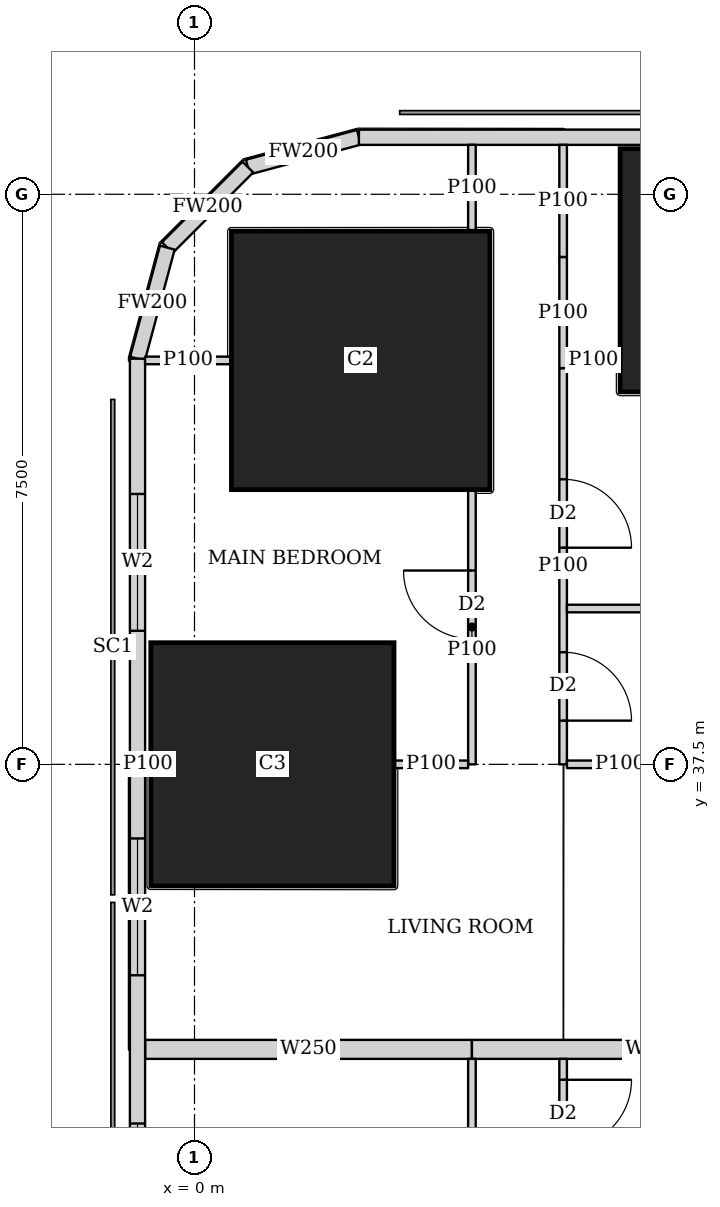
"""IFC4 building model, lengths in metres.
Left out: names, types, materials, properties, quantities, classifications, styles, units other than length and angle.
Written with IfcOpenShell. Run it as: python <this file> out.ifc"""

import sys

from ifc_helpers import new_model, si_unit, direction, frame, frame_2d, origin, origin_2d, place, context, subcontext, project, spatial, rectangle, extrude, element, fill, save


model = new_model("IFC4")
c1 = context("Model", 3, precision=1e-05, world=origin(), true_north=direction((0.0, 1.0)))
c2 = subcontext(c1, "Body", "Model", "MODEL_VIEW")
j1 = project(units=[si_unit("LENGTHUNIT", "METRE"), si_unit("PLANEANGLEUNIT", "RADIAN")], contexts=[c1])
p1 = place(None, origin())
s1 = spatial("IfcSite", under=j1, at=p1, CompositionType="ELEMENT")
p2 = place(p1, origin())
s2 = spatial("IfcBuilding", under=s1, at=p2, CompositionType="ELEMENT")
p3 = place(p2, frame((0.0, 0.0, 23.75)))
s3 = spatial("IfcBuildingStorey", under=s2, at=p3, CompositionType="ELEMENT", Elevation=23.75)
p4 = place(p3, frame((1.025, 37.5, 0.0), z_axis=(0.0, 0.0, 1.0), x_axis=(1.0, 0.0, 0.0)))
e1 = element("IfcColumn", 1, at=p4, inside=s3, PredefinedType="COLUMN", context=c2, shape_type="SweptSolid", body=[
    extrude(rectangle(XDim=3.2, YDim=3.2, at=origin_2d()), origin(), (0.0, 0.0, 1.0), 3.75),
])
p5 = place(p3, frame((2.186, 42.814, 0.0), z_axis=(0.0, 0.0, 1.0), x_axis=(1.0, 0.0, 0.0)))
e2 = element("IfcColumn", 2, at=p5, inside=s3, PredefinedType="COLUMN", context=c2, shape_type="SweptSolid", body=[
    extrude(rectangle(XDim=3.4, YDim=3.4, at=origin_2d()), origin(), (0.0, 0.0, 1.0), 3.75),
])
p6 = place(p3, frame((7.2, 44.0, 0.0), z_axis=(0.0, 0.0, 1.0), x_axis=(1.0, 0.0, 0.0)))
e3 = element("IfcColumn", 3, at=p6, inside=s3, PredefinedType="COLUMN", context=c2, shape_type="SweptSolid", body=[
    extrude(rectangle(XDim=3.2, YDim=3.2, at=origin_2d()), origin(), (0.0, 0.0, 1.0), 3.75),
])
p7 = place(p3, frame((40.106, 45.75, 0.0), z_axis=(0.0, 0.0, 1.0), x_axis=(-1.0, 0.0, 0.0)))
e4 = element("IfcWall", 4, at=p7, inside=s3, PredefinedType="SOLIDWALL", context=c2, shape_type="SweptSolid", body=[
    extrude(rectangle(XDim=37.943, YDim=0.2, at=frame_2d((18.971, 0.0))), origin(), (0.0, 0.0, 1.0), 3.5),
])
p8 = place(p7, frame((8.606, 0.0, 0.9)))
e5 = element("IfcOpeningElement", 5, at=p8, cuts=e4, PredefinedType="OPENING", context=c2, shape_type="SweptSolid", body=[
    extrude(rectangle(XDim=1.8, YDim=1.5, at=frame_2d((0.9, 0.75))), frame((0.0, 0.11, 0.0), z_axis=(0.0, -1.0, 0.0), x_axis=(1.0, 0.0, 0.0)), (0.0, 0.0, 1.0), 0.22),
])
p9 = place(p7, frame((12.206, 0.0, 0.9)))
e6 = element("IfcOpeningElement", 6, at=p9, cuts=e4, PredefinedType="OPENING", context=c2, shape_type="SweptSolid", body=[
    extrude(rectangle(XDim=1.8, YDim=1.5, at=frame_2d((0.9, 0.75))), frame((0.0, 0.11, 0.0), z_axis=(0.0, -1.0, 0.0), x_axis=(1.0, 0.0, 0.0)), (0.0, 0.0, 1.0), 0.22),
])
p10 = place(p7, frame((15.806, 0.0, 0.9)))
e7 = element("IfcOpeningElement", 7, at=p10, cuts=e4, PredefinedType="OPENING", context=c2, shape_type="SweptSolid", body=[
    extrude(rectangle(XDim=1.8, YDim=1.5, at=frame_2d((0.9, 0.75))), frame((0.0, 0.11, 0.0), z_axis=(0.0, -1.0, 0.0), x_axis=(1.0, 0.0, 0.0)), (0.0, 0.0, 1.0), 0.22),
])
p11 = place(p7, frame((19.406, 0.0, 0.9)))
e8 = element("IfcOpeningElement", 8, at=p11, cuts=e4, PredefinedType="OPENING", context=c2, shape_type="SweptSolid", body=[
    extrude(rectangle(XDim=1.8, YDim=1.5, at=frame_2d((0.9, 0.75))), frame((0.0, 0.11, 0.0), z_axis=(0.0, -1.0, 0.0), x_axis=(1.0, 0.0, 0.0)), (0.0, 0.0, 1.0), 0.22),
])
p12 = place(p7, frame((23.006, 0.0, 0.9)))
e9 = element("IfcOpeningElement", 9, at=p12, cuts=e4, PredefinedType="OPENING", context=c2, shape_type="SweptSolid", body=[
    extrude(rectangle(XDim=1.8, YDim=1.5, at=frame_2d((0.9, 0.75))), frame((0.0, 0.11, 0.0), z_axis=(0.0, -1.0, 0.0), x_axis=(1.0, 0.0, 0.0)), (0.0, 0.0, 1.0), 0.22),
])
p13 = place(p7, frame((26.606, 0.0, 0.9)))
e10 = element("IfcOpeningElement", 10, at=p13, cuts=e4, PredefinedType="OPENING", context=c2, shape_type="SweptSolid", body=[
    extrude(rectangle(XDim=1.8, YDim=1.5, at=frame_2d((0.9, 0.75))), frame((0.0, 0.11, 0.0), z_axis=(0.0, -1.0, 0.0), x_axis=(1.0, 0.0, 0.0)), (0.0, 0.0, 1.0), 0.22),
])
p14 = place(p3, frame((2.163, 45.75, 0.0), z_axis=(0.0, 0.0, 1.0), x_axis=(-0.965832000415, -0.259168954497, 0.0)))
e11 = element("IfcWall", 11, at=p14, inside=s3, PredefinedType="SOLIDWALL", context=c2, shape_type="SweptSolid", body=[
    extrude(rectangle(XDim=1.513, YDim=0.2, at=frame_2d((0.756, 0.0))), origin(), (0.0, 0.0, 1.0), 3.5),
])
p15 = place(p3, frame((0.702, 45.358, 0.0), z_axis=(0.0, 0.0, 1.0), x_axis=(-0.707106781187, -0.707106781187, 0.0)))
e12 = element("IfcWall", 12, at=p15, inside=s3, PredefinedType="SOLIDWALL", context=c2, shape_type="SweptSolid", body=[
    extrude(rectangle(XDim=1.499, YDim=0.2, at=frame_2d((0.75, 0.0))), origin(), (0.0, 0.0, 1.0), 3.5),
])
p16 = place(p3, frame((-0.358, 44.298, 0.0), z_axis=(0.0, 0.0, 1.0), x_axis=(-0.259168954497, -0.965832000415, 0.0)))
e13 = element("IfcWall", 13, at=p16, inside=s3, PredefinedType="SOLIDWALL", context=c2, shape_type="SweptSolid", body=[
    extrude(rectangle(XDim=1.513, YDim=0.2, at=frame_2d((0.756, 0.0))), origin(), (0.0, 0.0, 1.0), 3.5),
])
p17 = place(p3, frame((-0.75, 42.837, 0.0), z_axis=(0.0, 0.0, 1.0), x_axis=(0.0, -1.0, 0.0)))
e14 = element("IfcWall", 14, at=p17, inside=s3, PredefinedType="SOLIDWALL", context=c2, shape_type="SweptSolid", body=[
    extrude(rectangle(XDim=40.674, YDim=0.2, at=frame_2d((20.337, 0.0))), origin(), (0.0, 0.0, 1.0), 3.5),
])
p18 = place(p17, frame((1.78, 0.0, 0.9)))
e15 = element("IfcOpeningElement", 15, at=p18, cuts=e14, PredefinedType="OPENING", context=c2, shape_type="SweptSolid", body=[
    extrude(rectangle(XDim=1.8, YDim=1.5, at=frame_2d((0.9, 0.75))), frame((0.0, 0.11, 0.0), z_axis=(0.0, -1.0, 0.0), x_axis=(1.0, 0.0, 0.0)), (0.0, 0.0, 1.0), 0.22),
])
p19 = place(p17, frame((6.312, 0.0, 0.9)))
e16 = element("IfcOpeningElement", 16, at=p19, cuts=e14, PredefinedType="OPENING", context=c2, shape_type="SweptSolid", body=[
    extrude(rectangle(XDim=1.8, YDim=1.5, at=frame_2d((0.9, 0.75))), frame((0.0, 0.11, 0.0), z_axis=(0.0, -1.0, 0.0), x_axis=(1.0, 0.0, 0.0)), (0.0, 0.0, 1.0), 0.22),
])
p20 = place(p17, frame((10.062, 0.0, 0.9)))
e17 = element("IfcOpeningElement", 17, at=p20, cuts=e14, PredefinedType="OPENING", context=c2, shape_type="SweptSolid", body=[
    extrude(rectangle(XDim=1.8, YDim=1.5, at=frame_2d((0.9, 0.75))), frame((0.0, 0.11, 0.0), z_axis=(0.0, -1.0, 0.0), x_axis=(1.0, 0.0, 0.0)), (0.0, 0.0, 1.0), 0.22),
])
p21 = place(p17, frame((13.812, 0.0, 0.9)))
e18 = element("IfcOpeningElement", 18, at=p21, cuts=e14, PredefinedType="OPENING", context=c2, shape_type="SweptSolid", body=[
    extrude(rectangle(XDim=1.8, YDim=1.5, at=frame_2d((0.9, 0.75))), frame((0.0, 0.11, 0.0), z_axis=(0.0, -1.0, 0.0), x_axis=(1.0, 0.0, 0.0)), (0.0, 0.0, 1.0), 0.22),
])
p22 = place(p17, frame((17.562, 0.0, 0.9)))
e19 = element("IfcOpeningElement", 19, at=p22, cuts=e14, PredefinedType="OPENING", context=c2, shape_type="SweptSolid", body=[
    extrude(rectangle(XDim=1.8, YDim=1.5, at=frame_2d((0.9, 0.75))), frame((0.0, 0.11, 0.0), z_axis=(0.0, -1.0, 0.0), x_axis=(1.0, 0.0, 0.0)), (0.0, 0.0, 1.0), 0.22),
])
p23 = place(p17, frame((21.312, 0.0, 0.9)))
e20 = element("IfcOpeningElement", 20, at=p23, cuts=e14, PredefinedType="OPENING", context=c2, shape_type="SweptSolid", body=[
    extrude(rectangle(XDim=1.8, YDim=1.5, at=frame_2d((0.9, 0.75))), frame((0.0, 0.11, 0.0), z_axis=(0.0, -1.0, 0.0), x_axis=(1.0, 0.0, 0.0)), (0.0, 0.0, 1.0), 0.22),
])
p24 = place(p17, frame((25.062, 0.0, 0.9)))
e21 = element("IfcOpeningElement", 21, at=p24, cuts=e14, PredefinedType="OPENING", context=c2, shape_type="SweptSolid", body=[
    extrude(rectangle(XDim=1.8, YDim=1.5, at=frame_2d((0.9, 0.75))), frame((0.0, 0.11, 0.0), z_axis=(0.0, -1.0, 0.0), x_axis=(1.0, 0.0, 0.0)), (0.0, 0.0, 1.0), 0.22),
])
p25 = place(p17, frame((28.812, 0.0, 0.9)))
e22 = element("IfcOpeningElement", 22, at=p25, cuts=e14, PredefinedType="OPENING", context=c2, shape_type="SweptSolid", body=[
    extrude(rectangle(XDim=1.8, YDim=1.5, at=frame_2d((0.9, 0.75))), frame((0.0, 0.11, 0.0), z_axis=(0.0, -1.0, 0.0), x_axis=(1.0, 0.0, 0.0)), (0.0, 0.0, 1.0), 0.22),
])
p26 = place(p17, frame((32.562, 0.0, 0.9)))
e23 = element("IfcOpeningElement", 23, at=p26, cuts=e14, PredefinedType="OPENING", context=c2, shape_type="SweptSolid", body=[
    extrude(rectangle(XDim=1.8, YDim=1.5, at=frame_2d((0.9, 0.75))), frame((0.0, 0.11, 0.0), z_axis=(0.0, -1.0, 0.0), x_axis=(1.0, 0.0, 0.0)), (0.0, 0.0, 1.0), 0.22),
])
p27 = place(p17, frame((37.094, 0.0, 0.9)))
e24 = element("IfcOpeningElement", 24, at=p27, cuts=e14, PredefinedType="OPENING", context=c2, shape_type="SweptSolid", body=[
    extrude(rectangle(XDim=1.8, YDim=1.5, at=frame_2d((0.9, 0.75))), frame((0.0, 0.11, 0.0), z_axis=(0.0, -1.0, 0.0), x_axis=(1.0, 0.0, 0.0)), (0.0, 0.0, 1.0), 0.22),
])
p28 = place(p3, frame((3.65, 30.0, 0.0), z_axis=(0.0, 0.0, 1.0), x_axis=(0.0, 1.0, 0.0)))
e25 = element("IfcWall", 25, at=p28, inside=s3, PredefinedType="PARTITIONING", context=c2, shape_type="SweptSolid", body=[
    extrude(rectangle(XDim=3.625, YDim=0.1, at=frame_2d((1.812, 0.0))), origin(), (0.0, 0.0, 1.0), 3.5),
])
p29 = place(p28, frame((1.65, 0.0, 0.0)))
e26 = element("IfcOpeningElement", 26, at=p29, cuts=e25, PredefinedType="OPENING", context=c2, shape_type="SweptSolid", body=[
    extrude(rectangle(XDim=0.9, YDim=2.1, at=frame_2d((0.45, 1.05))), frame((0.0, 0.06, 0.0), z_axis=(0.0, -1.0, 0.0), x_axis=(1.0, 0.0, 0.0)), (0.0, 0.0, 1.0), 0.12),
])
p30 = place(p3, frame((4.85, 30.0, 0.0), z_axis=(0.0, 0.0, 1.0), x_axis=(0.0, 1.0, 0.0)))
e27 = element("IfcWall", 27, at=p30, inside=s3, PredefinedType="PARTITIONING", context=c2, shape_type="SweptSolid", body=[
    extrude(rectangle(XDim=3.625, YDim=0.1, at=frame_2d((1.812, 0.0))), origin(), (0.0, 0.0, 1.0), 3.5),
])
p31 = place(p30, frame((0.575, 0.0, 0.0)))
e28 = element("IfcOpeningElement", 28, at=p31, cuts=e27, PredefinedType="OPENING", context=c2, shape_type="SweptSolid", body=[
    extrude(rectangle(XDim=0.9, YDim=2.1, at=frame_2d((0.45, 1.05))), frame((0.0, 0.06, 0.0), z_axis=(0.0, -1.0, 0.0), x_axis=(1.0, 0.0, 0.0)), (0.0, 0.0, 1.0), 0.12),
])
p32 = place(p30, frame((2.45, 0.0, 0.0)))
e29 = element("IfcOpeningElement", 29, at=p32, cuts=e27, PredefinedType="OPENING", context=c2, shape_type="SweptSolid", body=[
    extrude(rectangle(XDim=0.9, YDim=2.1, at=frame_2d((0.45, 1.05))), frame((0.0, 0.06, 0.0), z_axis=(0.0, -1.0, 0.0), x_axis=(1.0, 0.0, 0.0)), (0.0, 0.0, 1.0), 0.12),
])
p33 = place(p3, frame((3.65, 37.5, 0.0), z_axis=(0.0, 0.0, 1.0), x_axis=(0.0, 1.0, 0.0)))
e30 = element("IfcWall", 30, at=p33, inside=s3, PredefinedType="PARTITIONING", context=c2, shape_type="SweptSolid", body=[
    extrude(rectangle(XDim=3.613, YDim=0.1, at=frame_2d((1.807, 0.0))), origin(), (0.0, 0.0, 1.0), 3.5),
])
p34 = place(p33, frame((1.65, 0.0, 0.0)))
e31 = element("IfcOpeningElement", 31, at=p34, cuts=e30, PredefinedType="OPENING", context=c2, shape_type="SweptSolid", body=[
    extrude(rectangle(XDim=0.9, YDim=2.1, at=frame_2d((0.45, 1.05))), frame((0.0, 0.06, 0.0), z_axis=(0.0, -1.0, 0.0), x_axis=(1.0, 0.0, 0.0)), (0.0, 0.0, 1.0), 0.12),
])
p35 = place(p3, frame((3.65, 44.515, 0.0), z_axis=(0.0, 0.0, 1.0), x_axis=(0.0, 1.0, 0.0)))
e32 = element("IfcWall", 32, at=p35, inside=s3, PredefinedType="PARTITIONING", context=c2, shape_type="SweptSolid", body=[
    extrude(rectangle(XDim=1.135, YDim=0.1, at=frame_2d((0.567, 0.0))), origin(), (0.0, 0.0, 1.0), 3.5),
])
p36 = place(p3, frame((4.85, 37.5, 0.0), z_axis=(0.0, 0.0, 1.0), x_axis=(0.0, 1.0, 0.0)))
e33 = element("IfcWall", 33, at=p36, inside=s3, PredefinedType="PARTITIONING", context=c2, shape_type="SweptSolid", body=[
    extrude(rectangle(XDim=5.213, YDim=0.1, at=frame_2d((2.606, 0.0))), origin(), (0.0, 0.0, 1.0), 3.5),
])
p37 = place(p36, frame((0.575, 0.0, 0.0)))
e34 = element("IfcOpeningElement", 34, at=p37, cuts=e33, PredefinedType="OPENING", context=c2, shape_type="SweptSolid", body=[
    extrude(rectangle(XDim=0.9, YDim=2.1, at=frame_2d((0.45, 1.05))), frame((0.0, 0.06, 0.0), z_axis=(0.0, -1.0, 0.0), x_axis=(1.0, 0.0, 0.0)), (0.0, 0.0, 1.0), 0.12),
])
p38 = place(p36, frame((2.85, 0.0, 0.0)))
e35 = element("IfcOpeningElement", 35, at=p38, cuts=e33, PredefinedType="OPENING", context=c2, shape_type="SweptSolid", body=[
    extrude(rectangle(XDim=0.9, YDim=2.1, at=frame_2d((0.45, 1.05))), frame((0.0, 0.06, 0.0), z_axis=(0.0, -1.0, 0.0), x_axis=(1.0, 0.0, 0.0)), (0.0, 0.0, 1.0), 0.12),
])
p39 = place(p3, frame((4.85, 42.713, 0.0), z_axis=(0.0, 0.0, 1.0), x_axis=(0.0, 1.0, 0.0)))
e36 = element("IfcWall", 36, at=p39, inside=s3, PredefinedType="PARTITIONING", context=c2, shape_type="SweptSolid", body=[
    extrude(rectangle(XDim=1.462, YDim=0.1, at=frame_2d((0.731, 0.0))), origin(), (0.0, 0.0, 1.0), 2.1),
])
p40 = place(p3, frame((4.85, 44.175, 0.0), z_axis=(0.0, 0.0, 1.0), x_axis=(0.0, 1.0, 0.0)))
e37 = element("IfcWall", 37, at=p40, inside=s3, PredefinedType="PARTITIONING", context=c2, shape_type="SweptSolid", body=[
    extrude(rectangle(XDim=1.475, YDim=0.1, at=frame_2d((0.737, 0.0))), origin(), (0.0, 0.0, 1.0), 3.5),
])
p41 = place(p3, frame((-0.65, 37.5, 0.0), z_axis=(0.0, 0.0, 1.0), x_axis=(1.0, 0.0, 0.0)))
e38 = element("IfcWall", 38, at=p41, inside=s3, PredefinedType="PARTITIONING", context=c2, shape_type="SweptSolid", body=[
    extrude(rectangle(XDim=0.074, YDim=0.1, at=frame_2d((0.037, 0.0))), origin(), (0.0, 0.0, 1.0), 3.5),
])
p42 = place(p3, frame((2.626, 37.5, 0.0), z_axis=(0.0, 0.0, 1.0), x_axis=(1.0, 0.0, 0.0)))
e39 = element("IfcWall", 39, at=p42, inside=s3, PredefinedType="PARTITIONING", context=c2, shape_type="SweptSolid", body=[
    extrude(rectangle(XDim=0.974, YDim=0.1, at=frame_2d((0.487, 0.0))), origin(), (0.0, 0.0, 1.0), 3.5),
])
p43 = place(p3, frame((-0.65, 42.814, 0.0), z_axis=(0.0, 0.0, 1.0), x_axis=(1.0, 0.0, 0.0)))
e40 = element("IfcWall", 40, at=p43, inside=s3, PredefinedType="PARTITIONING", context=c2, shape_type="SweptSolid", body=[
    extrude(rectangle(XDim=1.135, YDim=0.1, at=frame_2d((0.567, 0.0))), origin(), (0.0, 0.0, 1.0), 3.5),
])
p44 = place(p3, frame((4.9, 37.5, 0.0), z_axis=(0.0, 0.0, 1.0), x_axis=(1.0, 0.0, 0.0)))
e41 = element("IfcWall", 41, at=p44, inside=s3, PredefinedType="PARTITIONING", context=c2, shape_type="SweptSolid", body=[
    extrude(rectangle(XDim=1.399, YDim=0.1, at=frame_2d((0.7, 0.0))), origin(), (0.0, 0.0, 1.0), 3.5),
])
p45 = place(p3, frame((4.9, 42.814, 0.0), z_axis=(0.0, 0.0, 1.0), x_axis=(1.0, 0.0, 0.0)))
e42 = element("IfcWall", 42, at=p45, inside=s3, PredefinedType="PARTITIONING", context=c2, shape_type="SweptSolid", body=[
    extrude(rectangle(XDim=0.699, YDim=0.1, at=frame_2d((0.35, 0.0))), origin(), (0.0, 0.0, 1.0), 2.1),
])
p46 = place(p3, frame((4.9, 39.55, 0.0), z_axis=(0.0, 0.0, 1.0), x_axis=(1.0, 0.0, 0.0)))
e43 = element("IfcWall", 43, at=p46, inside=s3, PredefinedType="PARTITIONING", context=c2, shape_type="SweptSolid", body=[
    extrude(rectangle(XDim=3.525, YDim=0.1, at=frame_2d((1.763, 0.0))), origin(), (0.0, 0.0, 1.0), 3.5),
])
p47 = place(p3, frame((-0.65, 33.75, 0.0), z_axis=(0.0, 0.0, 1.0), x_axis=(1.0, 0.0, 0.0)))
e44 = element("IfcWall", 44, at=p47, inside=s3, PredefinedType="SOLIDWALL", context=c2, shape_type="SweptSolid", body=[
    extrude(rectangle(XDim=4.3, YDim=0.25, at=frame_2d((2.15, 0.0))), origin(), (0.0, 0.0, 1.0), 2.05),
])
p48 = place(p3, frame((3.65, 33.75, 0.0), z_axis=(0.0, 0.0, 1.0), x_axis=(1.0, 0.0, 0.0)))
e45 = element("IfcWall", 45, at=p48, inside=s3, PredefinedType="SOLIDWALL", context=c2, shape_type="SweptSolid", body=[
    extrude(rectangle(XDim=4.775, YDim=0.25, at=frame_2d((2.388, 0.0))), origin(), (0.0, 0.0, 1.0), 3.5),
])
p49 = place(p18, origin())
e46 = element("IfcWindow", 46, at=p49, inside=s3, PartitioningType="SINGLE_PANEL", PredefinedType="WINDOW", context=c2, shape_type="SweptSolid", body=[
    extrude(rectangle(XDim=1.8, YDim=1.5, at=frame_2d((0.9, 0.75))), frame((0.0, 0.03, 0.0), z_axis=(0.0, -1.0, 0.0), x_axis=(1.0, 0.0, 0.0)), (0.0, 0.0, 1.0), 0.06),
])
fill(e15, e46)
p50 = place(p19, origin())
e47 = element("IfcWindow", 47, at=p50, inside=s3, PartitioningType="SINGLE_PANEL", PredefinedType="WINDOW", context=c2, shape_type="SweptSolid", body=[
    extrude(rectangle(XDim=1.8, YDim=1.5, at=frame_2d((0.9, 0.75))), frame((0.0, 0.03, 0.0), z_axis=(0.0, -1.0, 0.0), x_axis=(1.0, 0.0, 0.0)), (0.0, 0.0, 1.0), 0.06),
])
fill(e16, e47)
p51 = place(p20, origin())
e48 = element("IfcWindow", 48, at=p51, inside=s3, PartitioningType="SINGLE_PANEL", PredefinedType="WINDOW", context=c2, shape_type="SweptSolid", body=[
    extrude(rectangle(XDim=1.8, YDim=1.5, at=frame_2d((0.9, 0.75))), frame((0.0, 0.03, 0.0), z_axis=(0.0, -1.0, 0.0), x_axis=(1.0, 0.0, 0.0)), (0.0, 0.0, 1.0), 0.06),
])
fill(e17, e48)
p52 = place(p32, origin())
e49 = element("IfcDoor", 49, at=p52, inside=s3, OperationType="SINGLE_SWING_LEFT", PredefinedType="DOOR", context=c2, shape_type="SweptSolid", body=[
    extrude(rectangle(XDim=0.9, YDim=2.1, at=frame_2d((0.45, 1.05))), frame((0.0, 0.025, 0.0), z_axis=(0.0, -1.0, 0.0), x_axis=(1.0, 0.0, 0.0)), (0.0, 0.0, 1.0), 0.05),
])
fill(e29, e49)
p53 = place(p34, origin())
e50 = element("IfcDoor", 50, at=p53, inside=s3, OperationType="SINGLE_SWING_RIGHT", PredefinedType="DOOR", context=c2, shape_type="SweptSolid", body=[
    extrude(rectangle(XDim=0.9, YDim=2.1, at=frame_2d((0.45, 1.05))), frame((0.0, 0.025, 0.0), z_axis=(0.0, -1.0, 0.0), x_axis=(1.0, 0.0, 0.0)), (0.0, 0.0, 1.0), 0.05),
])
fill(e31, e50)
p54 = place(p37, origin())
e51 = element("IfcDoor", 51, at=p54, inside=s3, OperationType="SINGLE_SWING_RIGHT", PredefinedType="DOOR", context=c2, shape_type="SweptSolid", body=[
    extrude(rectangle(XDim=0.9, YDim=2.1, at=frame_2d((0.45, 1.05))), frame((0.0, 0.025, 0.0), z_axis=(0.0, -1.0, 0.0), x_axis=(1.0, 0.0, 0.0)), (0.0, 0.0, 1.0), 0.05),
])
fill(e34, e51)
p55 = place(p38, origin())
e52 = element("IfcDoor", 52, at=p55, inside=s3, OperationType="SINGLE_SWING_RIGHT", PredefinedType="DOOR", context=c2, shape_type="SweptSolid", body=[
    extrude(rectangle(XDim=0.9, YDim=2.1, at=frame_2d((0.45, 1.05))), frame((0.0, 0.025, 0.0), z_axis=(0.0, -1.0, 0.0), x_axis=(1.0, 0.0, 0.0)), (0.0, 0.0, 1.0), 0.05),
])
fill(e35, e52)
save(model, sys.argv[1])
